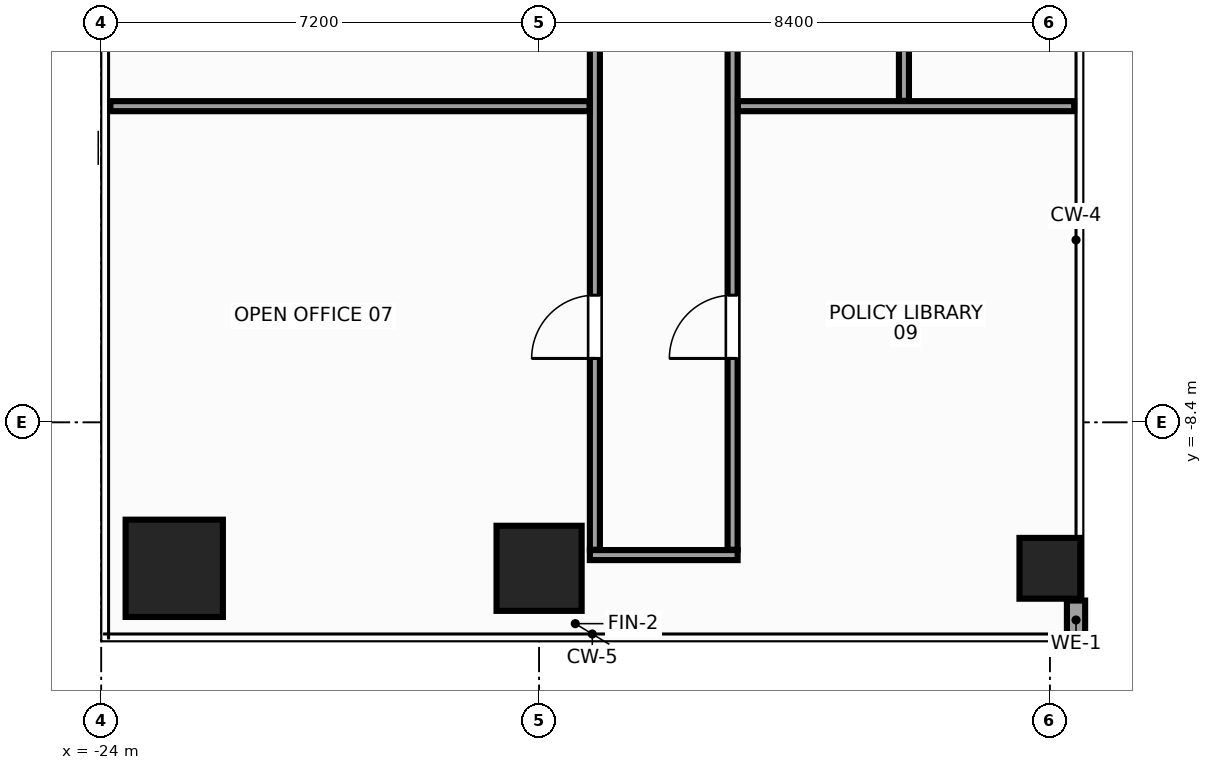
"""IFC4 building model, lengths in metres.
Left out: names, types, materials, properties, quantities, classifications, styles, units other than length and angle.
Written with IfcOpenShell. Run it as: python <this file> out.ifc"""

import sys

from ifc_helpers import new_model, si_unit, direction, frame, frame_2d, origin, origin_2d, place, context, subcontext, project, spatial, rectangle, hollow_rectangle, extrude, source, transform, mapped, element, fill, save


model = new_model("IFC4")
c1 = context("Model", 3, precision=1e-05, world=origin(), true_north=direction((0.0, 1.0)))
c2 = subcontext(c1, "Body", "Model", "MODEL_VIEW")
j1 = project(units=[si_unit("LENGTHUNIT", "METRE"), si_unit("PLANEANGLEUNIT", "RADIAN")], contexts=[c1])
p1 = place(None, origin())
s1 = spatial("IfcSite", under=j1, at=p1, CompositionType="ELEMENT")
p2 = place(p1, origin())
s2 = spatial("IfcBuilding", under=s1, at=p2, CompositionType="ELEMENT")
p3 = place(p2, frame((0.0, 0.0, 221.6)))
s3 = spatial("IfcBuildingStorey", under=s2, at=p3, CompositionType="ELEMENT", Elevation=221.6)
m1 = source(origin(), c2, "Body", "SweptSolid", [
    extrude(rectangle(XDim=1.4, YDim=1.4, at=origin_2d()), origin(), (0.0, 0.0, 1.0), 3.6),
])
p4 = place(p3, frame((-16.8, -10.8, 0.0), z_axis=(0.0, 0.0, 1.0), x_axis=(1.0, 0.0, 0.0)))
e1 = element("IfcColumn", 1, at=p4, inside=s3, PredefinedType="COLUMN", context=c2, shape_type="MappedRepresentation", body=[
    mapped(m1, transform((0.0, 0.0, 0.0), x_axis=(1.0, 0.0, 0.0), y_axis=(0.0, 1.0, 0.0), z_axis=(0.0, 0.0, 1.0), scale=1.0)),
])
m2 = source(origin(), c2, "Body", "SweptSolid", [
    extrude(rectangle(XDim=1.6, YDim=1.6, at=origin_2d()), origin(), (0.0, 0.0, 1.0), 3.6),
])
p5 = place(p3, frame((-22.8, -10.8, 0.0), z_axis=(0.0, 0.0, 1.0), x_axis=(1.0, 0.0, 0.0)))
e2 = element("IfcColumn", 2, at=p5, inside=s3, PredefinedType="COLUMN", context=c2, shape_type="MappedRepresentation", body=[
    mapped(m2, transform((0.0, 0.0, 0.0), x_axis=(1.0, 0.0, 0.0), y_axis=(0.0, 1.0, 0.0), z_axis=(0.0, 0.0, 1.0), scale=1.0)),
])
m3 = source(origin(), c2, "Body", "SweptSolid", [
    extrude(hollow_rectangle(XDim=1.0, YDim=1.0, WallThickness=0.045, at=origin_2d()), origin(), (0.0, 0.0, 1.0), 3.6),
])
p6 = place(p3, frame((-8.4, -10.8, 0.0), z_axis=(0.0, 0.0, 1.0), x_axis=(1.0, 0.0, 0.0)))
e3 = element("IfcColumn", 3, at=p6, inside=s3, PredefinedType="COLUMN", context=c2, shape_type="MappedRepresentation", body=[
    mapped(m3, transform((0.0, 0.0, 0.0), x_axis=(1.0, 0.0, 0.0), y_axis=(0.0, 1.0, 0.0), z_axis=(0.0, 0.0, 1.0), scale=1.0)),
])
m4 = source(origin(), c2, "Body", "SweptSolid", [
    extrude(rectangle(XDim=0.64, YDim=0.24, at=frame_2d((0.32, 0.0))), origin(), (0.0, 0.0, 1.0), 2.76),
])
p7 = place(p3, frame((-7.97, -11.97, 0.0), z_axis=(0.0, 0.0, 1.0), x_axis=(0.0, 1.0, 0.0)))
e4 = element("IfcWall", 4, at=p7, inside=s3, PredefinedType="STANDARD", context=c2, shape_type="MappedRepresentation", body=[
    mapped(m4, transform((0.0, 0.0, 0.0), x_axis=(1.0, 0.0, 0.0), y_axis=(0.0, 1.0, 0.0), z_axis=(0.0, 0.0, 1.0), scale=1.0)),
])
m5 = source(origin(), c2, "Body", "SweptSolid", [
    extrude(rectangle(XDim=2.43, YDim=0.165, at=frame_2d((1.215, 0.0))), origin(), (0.0, 0.0, 1.0), 2.915),
])
p8 = place(p3, frame((-15.965, -10.583, 0.0), z_axis=(0.0, 0.0, 1.0), x_axis=(1.0, 0.0, 0.0)))
e5 = element("IfcWall", 5, at=p8, inside=s3, PredefinedType="PARTITIONING", context=c2, shape_type="MappedRepresentation", body=[
    mapped(m5, transform((0.0, 0.0, 0.0), x_axis=(1.0, 0.0, 0.0), y_axis=(0.0, 1.0, 0.0), z_axis=(0.0, 0.0, 1.0), scale=1.0)),
])
m6 = source(origin(), c2, "Body", "SweptSolid", [
    extrude(rectangle(XDim=18.045, YDim=0.165, at=frame_2d((9.022, 0.0))), origin(), (0.0, 0.0, 1.0), 2.915),
])
p9 = place(p3, frame((-15.883, -10.495, 0.0), z_axis=(0.0, 0.0, 1.0), x_axis=(0.0, 1.0, 0.0)))
e6 = element("IfcWall", 6, at=p9, inside=s3, PredefinedType="PARTITIONING", context=c2, shape_type="MappedRepresentation", body=[
    mapped(m6, transform((0.0, 0.0, 0.0), x_axis=(1.0, 0.0, 0.0), y_axis=(0.0, 1.0, 0.0), z_axis=(0.0, 0.0, 1.0), scale=1.0)),
])
p10 = place(p9, frame((3.146, 0.0, 0.0)))
e7 = element("IfcOpeningElement", 7, at=p10, cuts=e6, PredefinedType="OPENING", context=c2, shape_type="SweptSolid", body=[
    extrude(rectangle(XDim=1.04, YDim=2.2, at=frame_2d((0.52, 1.1))), frame((0.0, 0.094, 0.0), z_axis=(0.0, -1.0, 0.0), x_axis=(1.0, 0.0, 0.0)), (0.0, 0.0, 1.0), 0.189),
])
p11 = place(p3, frame((-13.617, -10.495, 0.0), z_axis=(0.0, 0.0, 1.0), x_axis=(0.0, 1.0, 0.0)))
e8 = element("IfcWall", 8, at=p11, inside=s3, PredefinedType="PARTITIONING", context=c2, shape_type="MappedRepresentation", body=[
    mapped(m6, transform((0.0, 0.0, 0.0), x_axis=(1.0, 0.0, 0.0), y_axis=(0.0, 1.0, 0.0), z_axis=(0.0, 0.0, 1.0), scale=1.0)),
])
p12 = place(p11, frame((3.146, 0.0, 0.0)))
e9 = element("IfcOpeningElement", 9, at=p12, cuts=e8, PredefinedType="OPENING", context=c2, shape_type="SweptSolid", body=[
    extrude(rectangle(XDim=1.04, YDim=2.2, at=frame_2d((0.52, 1.1))), frame((0.0, 0.094, 0.0), z_axis=(0.0, -1.0, 0.0), x_axis=(1.0, 0.0, 0.0)), (0.0, 0.0, 1.0), 0.189),
])
m7 = source(origin(), c2, "Body", "SweptSolid", [
    extrude(rectangle(XDim=7.88, YDim=0.165, at=frame_2d((3.94, 0.0))), origin(), (0.0, 0.0, 1.0), 2.765),
])
p13 = place(p3, frame((-23.85, -3.2, 0.0), z_axis=(0.0, 0.0, 1.0), x_axis=(1.0, 0.0, 0.0)))
e10 = element("IfcWall", 10, at=p13, inside=s3, PredefinedType="PARTITIONING", context=c2, shape_type="MappedRepresentation", body=[
    mapped(m7, transform((0.0, 0.0, 0.0), x_axis=(1.0, 0.0, 0.0), y_axis=(0.0, 1.0, 0.0), z_axis=(0.0, 0.0, 1.0), scale=1.0)),
])
m8 = source(origin(), c2, "Body", "SweptSolid", [
    extrude(rectangle(XDim=5.53, YDim=0.165, at=frame_2d((2.765, 0.0))), origin(), (0.0, 0.0, 1.0), 2.765),
])
p14 = place(p3, frame((-13.53, -3.2, 0.0), z_axis=(0.0, 0.0, 1.0), x_axis=(1.0, 0.0, 0.0)))
e11 = element("IfcWall", 11, at=p14, inside=s3, PredefinedType="PARTITIONING", context=c2, shape_type="MappedRepresentation", body=[
    mapped(m8, transform((0.0, 0.0, 0.0), x_axis=(1.0, 0.0, 0.0), y_axis=(0.0, 1.0, 0.0), z_axis=(0.0, 0.0, 1.0), scale=1.0)),
])
m9 = source(origin(), c2, "Body", "SweptSolid", [
    extrude(rectangle(XDim=10.492, YDim=0.165, at=frame_2d((5.246, 0.0))), origin(), (0.0, 0.0, 1.0), 2.915),
])
p15 = place(p3, frame((-10.8, -3.113, 0.0), z_axis=(0.0, 0.0, 1.0), x_axis=(0.0, 1.0, 0.0)))
e12 = element("IfcWall", 12, at=p15, inside=s3, PredefinedType="PARTITIONING", context=c2, shape_type="MappedRepresentation", body=[
    mapped(m9, transform((0.0, 0.0, 0.0), x_axis=(1.0, 0.0, 0.0), y_axis=(0.0, 1.0, 0.0), z_axis=(0.0, 0.0, 1.0), scale=1.0)),
])
m10 = source(origin(), c2, "Body", "SweptSolid", [
    extrude(rectangle(XDim=1.04, YDim=2.2, at=frame_2d((0.52, 1.1))), frame((0.0, 0.025, 0.0), z_axis=(0.0, -1.0, 0.0), x_axis=(1.0, 0.0, 0.0)), (0.0, 0.0, 1.0), 0.05),
])
p16 = place(p10, origin())
e13 = element("IfcDoor", 13, at=p16, inside=s3, OperationType="SINGLE_SWING_LEFT", PredefinedType="DOOR", context=c2, shape_type="MappedRepresentation", body=[
    mapped(m10, transform((0.0, 0.0, 0.0), x_axis=(1.0, 0.0, 0.0), y_axis=(0.0, 1.0, 0.0), z_axis=(0.0, 0.0, 1.0), scale=1.0)),
])
fill(e7, e13)
p17 = place(p12, origin())
e14 = element("IfcDoor", 14, at=p17, inside=s3, OperationType="SINGLE_SWING_LEFT", PredefinedType="DOOR", context=c2, shape_type="MappedRepresentation", body=[
    mapped(m10, transform((0.0, 0.0, 0.0), x_axis=(1.0, 0.0, 0.0), y_axis=(0.0, 1.0, 0.0), z_axis=(0.0, 0.0, 1.0), scale=1.0)),
])
fill(e9, e14)
save(model, sys.argv[1])
